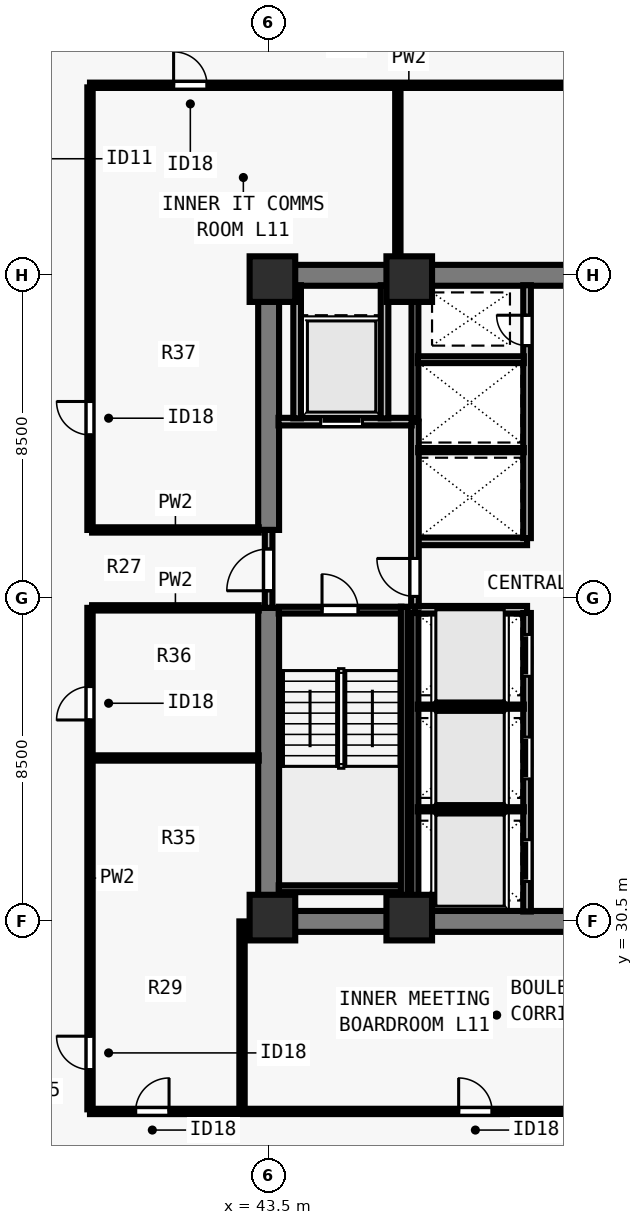
"""IFC4 building model, lengths in metres.
Left out: names, types, materials, properties, quantities, classifications, styles, units other than length and angle.
Written with IfcOpenShell. Run it as: python <this file> out.ifc"""

import sys

from ifc_helpers import new_model, si_unit, direction, frame, frame_2d, origin, origin_2d, place, context, subcontext, project, spatial, rectangle, extrude, element, fill, save


model = new_model("IFC4")
c1 = context("Model", 3, precision=1e-05, world=origin(), true_north=direction((0.0, 1.0)))
c2 = subcontext(c1, "Body", "Model", "MODEL_VIEW")
j1 = project(units=[si_unit("LENGTHUNIT", "METRE"), si_unit("PLANEANGLEUNIT", "RADIAN")], contexts=[c1])
p1 = place(None, origin())
s1 = spatial("IfcSite", under=j1, at=p1, CompositionType="ELEMENT")
p2 = place(p1, origin())
s2 = spatial("IfcBuilding", under=s1, at=p2, CompositionType="ELEMENT")
p3 = place(p2, frame((0.0, 0.0, 44.5)))
s3 = spatial("IfcBuildingStorey", under=s2, at=p3, CompositionType="ELEMENT", Elevation=44.5)
for number, where, z_axis, x_axis in (
    (1, (43.6, 30.6, 0.0), (0.0, 0.0, 1.0), (1.0, 0.0, 0.0)),
    (2, (47.2, 30.6, 0.0), (0.0, 0.0, 1.0), (1.0, 0.0, 0.0)),
    (3, (43.6, 47.4, 0.0), (0.0, 0.0, 1.0), (1.0, 0.0, 0.0)),
    (4, (47.2, 47.4, 0.0), (0.0, 0.0, 1.0), (1.0, 0.0, 0.0)),
):
    element("IfcColumn", number, at=place(p3, frame(where, z_axis=z_axis, x_axis=x_axis)), inside=s3, PredefinedType="COLUMN", context=c2, shape_type="SweptSolid", body=[
        extrude(rectangle(XDim=1.2, YDim=1.2, at=origin_2d()), origin(), (0.0, 0.0, 1.0), 3.5),
    ])
for number, where, z_axis, x_axis in (
    (5, (43.225, 30.5, 0.0), (0.0, 0.0, 1.0), (1.0, 0.0, 0.0)),
    (6, (43.225, 47.5, 0.0), (0.0, 0.0, 1.0), (1.0, 0.0, 0.0)),
):
    element("IfcWall", number, at=place(p3, frame(where, z_axis=z_axis, x_axis=x_axis)), inside=s3, PredefinedType="SHEAR", context=c2, shape_type="SweptSolid", body=[
        extrude(rectangle(XDim=17.55, YDim=0.55, at=frame_2d((8.775, 0.0))), origin(), (0.0, 0.0, 1.0), 3.28),
    ])
p4 = place(p3, frame((43.5, 30.765, 0.0), z_axis=(0.0, 0.0, 1.0), x_axis=(0.0, 1.0, 0.0)))
e7 = element("IfcWall", 7, at=p4, inside=s3, PredefinedType="SHEAR", context=c2, shape_type="SweptSolid", body=[
    extrude(rectangle(XDim=7.985, YDim=0.55, at=frame_2d((3.993, 0.0))), origin(), (0.0, 0.0, 1.0), 3.28),
])
p5 = place(p3, frame((43.5, 40.8, 0.0), z_axis=(0.0, 0.0, 1.0), x_axis=(0.0, 1.0, 0.0)))
e8 = element("IfcWall", 8, at=p5, inside=s3, PredefinedType="SHEAR", context=c2, shape_type="SweptSolid", body=[
    extrude(rectangle(XDim=6.435, YDim=0.55, at=frame_2d((3.218, 0.0))), origin(), (0.0, 0.0, 1.0), 3.28),
])
for number, where, z_axis, x_axis in (
    (9, (47.35, 38.7, 0.0), (0.0, 0.0, 1.0), (1.0, 0.0, 0.0)),
    (10, (47.35, 40.5, 0.0), (0.0, 0.0, 1.0), (1.0, 0.0, 0.0)),
):
    element("IfcWall", number, at=place(p3, frame(where, z_axis=z_axis, x_axis=x_axis)), inside=s3, PredefinedType="SOLIDWALL", context=c2, shape_type="SweptSolid", body=[
        extrude(rectangle(XDim=2.95, YDim=0.2, at=frame_2d((1.475, 0.0))), origin(), (0.0, 0.0, 1.0), 3.28),
    ])
p6 = place(p3, frame((50.3, 30.76, 0.0), z_axis=(0.0, 0.0, 1.0), x_axis=(0.0, 1.0, 0.0)))
e11 = element("IfcWall", 11, at=p6, inside=s3, PredefinedType="SOLIDWALL", context=c2, shape_type="SweptSolid", body=[
    extrude(rectangle(XDim=7.855, YDim=0.2, at=frame_2d((3.927, 0.0))), origin(), (0.0, 0.0, 1.0), 3.28),
])
p7 = place(p6, frame((0.79, 0.0, 0.0)))
e12 = element("IfcOpeningElement", 12, at=p7, cuts=e11, PredefinedType="OPENING", context=c2, shape_type="SweptSolid", body=[
    extrude(rectangle(XDim=1.1, YDim=2.2, at=frame_2d((0.55, 1.1))), frame((0.0, 0.11, 0.0), z_axis=(0.0, -1.0, 0.0), x_axis=(1.0, 0.0, 0.0)), (0.0, 0.0, 1.0), 0.22),
])
p8 = place(p6, frame((3.49, 0.0, 0.0)))
e13 = element("IfcOpeningElement", 13, at=p8, cuts=e11, PredefinedType="OPENING", context=c2, shape_type="SweptSolid", body=[
    extrude(rectangle(XDim=1.1, YDim=2.2, at=frame_2d((0.55, 1.1))), frame((0.0, 0.11, 0.0), z_axis=(0.0, -1.0, 0.0), x_axis=(1.0, 0.0, 0.0)), (0.0, 0.0, 1.0), 0.22),
])
p9 = place(p6, frame((6.19, 0.0, 0.0)))
e14 = element("IfcOpeningElement", 14, at=p9, cuts=e11, PredefinedType="OPENING", context=c2, shape_type="SweptSolid", body=[
    extrude(rectangle(XDim=1.1, YDim=2.2, at=frame_2d((0.55, 1.1))), frame((0.0, 0.11, 0.0), z_axis=(0.0, -1.0, 0.0), x_axis=(1.0, 0.0, 0.0)), (0.0, 0.0, 1.0), 0.22),
])
p10 = place(p3, frame((50.3, 40.585, 0.0), z_axis=(0.0, 0.0, 1.0), x_axis=(0.0, 1.0, 0.0)))
e15 = element("IfcWall", 15, at=p10, inside=s3, PredefinedType="SOLIDWALL", context=c2, shape_type="SweptSolid", body=[
    extrude(rectangle(XDim=6.655, YDim=0.2, at=frame_2d((3.328, 0.0))), origin(), (0.0, 0.0, 1.0), 3.28),
])
p11 = place(p10, frame((5.065, 0.0, 0.0)))
e16 = element("IfcOpeningElement", 16, at=p11, cuts=e15, PredefinedType="OPENING", context=c2, shape_type="SweptSolid", body=[
    extrude(rectangle(XDim=0.8, YDim=2.08, at=frame_2d((0.4, 1.04))), frame((0.0, 0.11, 0.0), z_axis=(0.0, -1.0, 0.0), x_axis=(1.0, 0.0, 0.0)), (0.0, 0.0, 1.0), 0.22),
])
p12 = place(p3, frame((43.5, 38.75, 0.0), z_axis=(0.0, 0.0, 1.0), x_axis=(0.0, 1.0, 0.0)))
e17 = element("IfcWall", 17, at=p12, inside=s3, PredefinedType="SOLIDWALL", context=c2, shape_type="SweptSolid", body=[
    extrude(rectangle(XDim=2.05, YDim=0.2, at=frame_2d((1.025, 0.0))), origin(), (0.0, 0.0, 1.0), 3.28),
])
p13 = place(p12, frame((0.45, 0.0, 0.0)))
e18 = element("IfcOpeningElement", 18, at=p13, cuts=e17, PredefinedType="OPENING", context=c2, shape_type="SweptSolid", body=[
    extrude(rectangle(XDim=1.1, YDim=2.15, at=frame_2d((0.55, 1.075))), frame((0.0, 0.11, 0.0), z_axis=(0.0, -1.0, 0.0), x_axis=(1.0, 0.0, 0.0)), (0.0, 0.0, 1.0), 0.22),
])
p14 = place(p3, frame((47.35, 38.785, 0.0), z_axis=(0.0, 0.0, 1.0), x_axis=(0.0, 1.0, 0.0)))
e19 = element("IfcWall", 19, at=p14, inside=s3, PredefinedType="SOLIDWALL", context=c2, shape_type="SweptSolid", body=[
    extrude(rectangle(XDim=4.865, YDim=0.2, at=frame_2d((2.433, 0.0))), origin(), (0.0, 0.0, 1.0), 3.28),
])
p15 = place(p14, frame((0.265, 0.0, 0.0)))
e20 = element("IfcOpeningElement", 20, at=p15, cuts=e19, PredefinedType="OPENING", context=c2, shape_type="SweptSolid", body=[
    extrude(rectangle(XDim=1.0, YDim=2.15, at=frame_2d((0.5, 1.075))), frame((0.0, 0.11, 0.0), z_axis=(0.0, -1.0, 0.0), x_axis=(1.0, 0.0, 0.0)), (0.0, 0.0, 1.0), 0.22),
])
p16 = place(p3, frame((43.76, 43.65, 0.0), z_axis=(0.0, 0.0, 1.0), x_axis=(1.0, 0.0, 0.0)))
e21 = element("IfcWall", 21, at=p16, inside=s3, PredefinedType="SOLIDWALL", context=c2, shape_type="SweptSolid", body=[
    extrude(rectangle(XDim=3.505, YDim=0.2, at=frame_2d((1.752, 0.0))), origin(), (0.0, 0.0, 1.0), 3.28),
])
p17 = place(p16, frame((1.11, 0.0, 0.0)))
e22 = element("IfcOpeningElement", 22, at=p17, cuts=e21, PredefinedType="OPENING", context=c2, shape_type="SweptSolid", body=[
    extrude(rectangle(XDim=1.1, YDim=2.2, at=frame_2d((0.55, 1.1))), frame((0.0, 0.11, 0.0), z_axis=(0.0, -1.0, 0.0), x_axis=(1.0, 0.0, 0.0)), (0.0, 0.0, 1.0), 0.22),
])
for number, where, z_axis, x_axis in (
    (23, (46.55, 43.735, 0.0), (0.0, 0.0, 1.0), (0.0, 1.0, 0.0)),
    (24, (44.25, 43.735, 0.0), (0.0, 0.0, 1.0), (0.0, 1.0, 0.0)),
):
    element("IfcWall", number, at=place(p3, frame(where, z_axis=z_axis, x_axis=x_axis)), inside=s3, PredefinedType="SOLIDWALL", context=c2, shape_type="SweptSolid", body=[
        extrude(rectangle(XDim=3.505, YDim=0.2, at=frame_2d((1.752, 0.0))), origin(), (0.0, 0.0, 1.0), 3.28),
    ])
p18 = place(p3, frame((47.35, 30.76, 0.0), z_axis=(0.0, 0.0, 1.0), x_axis=(0.0, 1.0, 0.0)))
e25 = element("IfcWall", 25, at=p18, inside=s3, PredefinedType="SOLIDWALL", context=c2, shape_type="SweptSolid", body=[
    extrude(rectangle(XDim=7.855, YDim=0.18, at=frame_2d((3.927, 0.0))), origin(), (0.0, 0.0, 1.0), 3.28),
])
for number, where, z_axis, x_axis in (
    (26, (47.425, 33.45, 0.0), (0.0, 0.0, 1.0), (1.0, 0.0, 0.0)),
    (27, (47.425, 36.15, 0.0), (0.0, 0.0, 1.0), (1.0, 0.0, 0.0)),
):
    element("IfcWall", number, at=place(p3, frame(where, z_axis=z_axis, x_axis=x_axis)), inside=s3, PredefinedType="PARTITIONING", context=c2, shape_type="SweptSolid", body=[
        extrude(rectangle(XDim=2.79, YDim=0.11, at=frame_2d((1.395, 0.0))), origin(), (0.0, 0.0, 1.0), 3.28),
    ])
p19 = place(p3, frame((47.35, 43.735, 0.0), z_axis=(0.0, 0.0, 1.0), x_axis=(0.0, 1.0, 0.0)))
e28 = element("IfcWall", 28, at=p19, inside=s3, PredefinedType="SOLIDWALL", context=c2, shape_type="SweptSolid", body=[
    extrude(rectangle(XDim=3.505, YDim=0.18, at=frame_2d((1.752, 0.0))), origin(), (0.0, 0.0, 1.0), 3.28),
])
p20 = place(p3, frame((47.435, 42.9, 0.0), z_axis=(0.0, 0.0, 1.0), x_axis=(1.0, 0.0, 0.0)))
e29 = element("IfcWall", 29, at=p20, inside=s3, PredefinedType="PARTITIONING", context=c2, shape_type="SweptSolid", body=[
    extrude(rectangle(XDim=2.78, YDim=0.11, at=frame_2d((1.39, 0.0))), origin(), (0.0, 0.0, 1.0), 3.28),
])
p21 = place(p3, frame((47.425, 45.28, 0.0), z_axis=(0.0, 0.0, 1.0), x_axis=(1.0, 0.0, 0.0)))
e30 = element("IfcWall", 30, at=p21, inside=s3, PredefinedType="SOLIDWALL", context=c2, shape_type="SweptSolid", body=[
    extrude(rectangle(XDim=2.79, YDim=0.18, at=frame_2d((1.395, 0.0))), origin(), (0.0, 0.0, 1.0), 3.28),
])
p22 = place(p3, frame((38.8, 25.5, 0.0), z_axis=(0.0, 0.0, 1.0), x_axis=(1.0, 0.0, 0.0)))
e31 = element("IfcWall", 31, at=p22, inside=s3, PredefinedType="PARTITIONING", context=c2, shape_type="SweptSolid", body=[
    extrude(rectangle(XDim=26.4, YDim=0.14, at=frame_2d((13.2, 0.0))), origin(), (0.0, 0.0, 1.0), 3.28),
])
p23 = place(p22, frame((1.2, 0.0, 0.0)))
e32 = element("IfcOpeningElement", 32, at=p23, cuts=e31, PredefinedType="OPENING", context=c2, shape_type="SweptSolid", body=[
    extrude(rectangle(XDim=0.88, YDim=2.1, at=frame_2d((0.44, 1.05))), frame((0.0, 0.08, 0.0), z_axis=(0.0, -1.0, 0.0), x_axis=(1.0, 0.0, 0.0)), (0.0, 0.0, 1.0), 0.16),
])
p24 = place(p22, frame((9.7, 0.0, 0.0)))
e33 = element("IfcOpeningElement", 33, at=p24, cuts=e31, PredefinedType="OPENING", context=c2, shape_type="SweptSolid", body=[
    extrude(rectangle(XDim=0.88, YDim=2.1, at=frame_2d((0.44, 1.05))), frame((0.0, 0.08, 0.0), z_axis=(0.0, -1.0, 0.0), x_axis=(1.0, 0.0, 0.0)), (0.0, 0.0, 1.0), 0.16),
])
p25 = place(p22, frame((20.2, 0.0, 0.0)))
e34 = element("IfcOpeningElement", 34, at=p25, cuts=e31, PredefinedType="OPENING", context=c2, shape_type="SweptSolid", body=[
    extrude(rectangle(XDim=0.88, YDim=2.1, at=frame_2d((0.44, 1.05))), frame((0.0, 0.08, 0.0), z_axis=(0.0, -1.0, 0.0), x_axis=(1.0, 0.0, 0.0)), (0.0, 0.0, 1.0), 0.16),
])
p26 = place(p3, frame((38.8, 52.5, 0.0), z_axis=(0.0, 0.0, 1.0), x_axis=(1.0, 0.0, 0.0)))
e35 = element("IfcWall", 35, at=p26, inside=s3, PredefinedType="PARTITIONING", context=c2, shape_type="SweptSolid", body=[
    extrude(rectangle(XDim=26.4, YDim=0.14, at=frame_2d((13.2, 0.0))), origin(), (0.0, 0.0, 1.0), 3.28),
])
p27 = place(p26, frame((2.2, 0.0, 0.0)))
e36 = element("IfcOpeningElement", 36, at=p27, cuts=e35, PredefinedType="OPENING", context=c2, shape_type="SweptSolid", body=[
    extrude(rectangle(XDim=0.88, YDim=2.1, at=frame_2d((0.44, 1.05))), frame((0.0, 0.08, 0.0), z_axis=(0.0, -1.0, 0.0), x_axis=(1.0, 0.0, 0.0)), (0.0, 0.0, 1.0), 0.16),
])
p28 = place(p26, frame((13.7, 0.0, 0.0)))
e37 = element("IfcOpeningElement", 37, at=p28, cuts=e35, PredefinedType="OPENING", context=c2, shape_type="SweptSolid", body=[
    extrude(rectangle(XDim=0.88, YDim=2.1, at=frame_2d((0.44, 1.05))), frame((0.0, 0.08, 0.0), z_axis=(0.0, -1.0, 0.0), x_axis=(1.0, 0.0, 0.0)), (0.0, 0.0, 1.0), 0.16),
])
p29 = place(p26, frame((23.2, 0.0, 0.0)))
e38 = element("IfcOpeningElement", 38, at=p29, cuts=e35, PredefinedType="OPENING", context=c2, shape_type="SweptSolid", body=[
    extrude(rectangle(XDim=0.88, YDim=2.1, at=frame_2d((0.44, 1.05))), frame((0.0, 0.08, 0.0), z_axis=(0.0, -1.0, 0.0), x_axis=(1.0, 0.0, 0.0)), (0.0, 0.0, 1.0), 0.16),
])
p30 = place(p3, frame((38.8, 25.555, 0.0), z_axis=(0.0, 0.0, 1.0), x_axis=(0.0, 1.0, 0.0)))
e39 = element("IfcWall", 39, at=p30, inside=s3, PredefinedType="PARTITIONING", context=c2, shape_type="SweptSolid", body=[
    extrude(rectangle(XDim=13.195, YDim=0.14, at=frame_2d((6.598, 0.0))), origin(), (0.0, 0.0, 1.0), 3.28),
])
p31 = place(p30, frame((1.045, 0.0, 0.0)))
e40 = element("IfcOpeningElement", 40, at=p31, cuts=e39, PredefinedType="OPENING", context=c2, shape_type="SweptSolid", body=[
    extrude(rectangle(XDim=0.88, YDim=2.1, at=frame_2d((0.44, 1.05))), frame((0.0, 0.08, 0.0), z_axis=(0.0, -1.0, 0.0), x_axis=(1.0, 0.0, 0.0)), (0.0, 0.0, 1.0), 0.16),
])
p32 = place(p30, frame((10.245, 0.0, 0.0)))
e41 = element("IfcOpeningElement", 41, at=p32, cuts=e39, PredefinedType="OPENING", context=c2, shape_type="SweptSolid", body=[
    extrude(rectangle(XDim=0.88, YDim=2.1, at=frame_2d((0.44, 1.05))), frame((0.0, 0.08, 0.0), z_axis=(0.0, -1.0, 0.0), x_axis=(1.0, 0.0, 0.0)), (0.0, 0.0, 1.0), 0.16),
])
p33 = place(p3, frame((38.8, 40.8, 0.0), z_axis=(0.0, 0.0, 1.0), x_axis=(0.0, 1.0, 0.0)))
e42 = element("IfcWall", 42, at=p33, inside=s3, PredefinedType="PARTITIONING", context=c2, shape_type="SweptSolid", body=[
    extrude(rectangle(XDim=11.645, YDim=0.14, at=frame_2d((5.823, 0.0))), origin(), (0.0, 0.0, 1.0), 3.28),
])
p34 = place(p33, frame((2.5, 0.0, 0.0)))
e43 = element("IfcOpeningElement", 43, at=p34, cuts=e42, PredefinedType="OPENING", context=c2, shape_type="SweptSolid", body=[
    extrude(rectangle(XDim=0.88, YDim=2.1, at=frame_2d((0.44, 1.05))), frame((0.0, 0.08, 0.0), z_axis=(0.0, -1.0, 0.0), x_axis=(1.0, 0.0, 0.0)), (0.0, 0.0, 1.0), 0.16),
])
for number, where, z_axis, x_axis in (
    (44, (38.855, 38.75, 0.0), (0.0, 0.0, 1.0), (1.0, 0.0, 0.0)),
    (45, (38.855, 40.8, 0.0), (0.0, 0.0, 1.0), (1.0, 0.0, 0.0)),
):
    element("IfcWall", number, at=place(p3, frame(where, z_axis=z_axis, x_axis=x_axis)), inside=s3, PredefinedType="PARTITIONING", context=c2, shape_type="SweptSolid", body=[
        extrude(rectangle(XDim=4.385, YDim=0.14, at=frame_2d((2.192, 0.0))), origin(), (0.0, 0.0, 1.0), 3.28),
    ])
p35 = place(p3, frame((42.8, 25.555, 0.0), z_axis=(0.0, 0.0, 1.0), x_axis=(0.0, 1.0, 0.0)))
e46 = element("IfcWall", 46, at=p35, inside=s3, PredefinedType="PARTITIONING", context=c2, shape_type="SweptSolid", body=[
    extrude(rectangle(XDim=4.945, YDim=0.14, at=frame_2d((2.473, 0.0))), origin(), (0.0, 0.0, 1.0), 2.439),
])
p36 = place(p3, frame((46.9, 47.76, 0.0), z_axis=(0.0, 0.0, 1.0), x_axis=(0.0, 1.0, 0.0)))
e47 = element("IfcWall", 47, at=p36, inside=s3, PredefinedType="PARTITIONING", context=c2, shape_type="SweptSolid", body=[
    extrude(rectangle(XDim=4.685, YDim=0.14, at=frame_2d((2.343, 0.0))), origin(), (0.0, 0.0, 1.0), 3.28),
])
p37 = place(p3, frame((38.855, 34.8, 0.0), z_axis=(0.0, 0.0, 1.0), x_axis=(1.0, 0.0, 0.0)))
e48 = element("IfcWall", 48, at=p37, inside=s3, PredefinedType="PARTITIONING", context=c2, shape_type="SweptSolid", body=[
    extrude(rectangle(XDim=4.385, YDim=0.14, at=frame_2d((2.192, 0.0))), origin(), (0.0, 0.0, 1.0), 3.28),
])
p38 = place(p3, frame((43.765, 38.69, 0.0), z_axis=(0.0, 0.0, 1.0), x_axis=(1.0, 0.0, 0.0)))
e49 = element("IfcWall", 49, at=p38, inside=s3, PredefinedType="SOLIDWALL", context=c2, shape_type="SweptSolid", body=[
    extrude(rectangle(XDim=3.23, YDim=0.18, at=frame_2d((1.615, 0.0))), origin(), (0.0, 0.0, 1.0), 3.28),
])
p39 = place(p38, frame((1.14, 0.0, 0.0)))
e50 = element("IfcOpeningElement", 50, at=p39, cuts=e49, PredefinedType="OPENING", context=c2, shape_type="SweptSolid", body=[
    extrude(rectangle(XDim=0.95, YDim=2.15, at=frame_2d((0.475, 1.075))), frame((0.0, 0.1, 0.0), z_axis=(0.0, -1.0, 0.0), x_axis=(1.0, 0.0, 0.0)), (0.0, 0.0, 1.0), 0.2),
])
p40 = place(p3, frame((43.765, 31.36, 0.0), z_axis=(0.0, 0.0, 1.0), x_axis=(1.0, 0.0, 0.0)))
e51 = element("IfcWall", 51, at=p40, inside=s3, PredefinedType="SOLIDWALL", context=c2, shape_type="SweptSolid", body=[
    extrude(rectangle(XDim=3.23, YDim=0.18, at=frame_2d((1.615, 0.0))), origin(), (0.0, 0.0, 1.0), 3.28),
])
p41 = place(p3, frame((47.07, 38.78, 0.0), z_axis=(0.0, 0.0, 1.0), x_axis=(0.0, -1.0, 0.0)))
e52 = element("IfcWall", 52, at=p41, inside=s3, PredefinedType="SOLIDWALL", context=c2, shape_type="SweptSolid", body=[
    extrude(rectangle(XDim=8.017, YDim=0.18, at=frame_2d((4.009, 0.0))), origin(), (0.0, 0.0, 1.0), 3.28),
])
p42 = place(p13, origin())
e53 = element("IfcDoor", 53, at=p42, inside=s3, OperationType="SINGLE_SWING_LEFT", PredefinedType="DOOR", context=c2, shape_type="SweptSolid", body=[
    extrude(rectangle(XDim=1.1, YDim=2.15, at=frame_2d((0.55, 1.075))), frame((0.0, 0.025, 0.0), z_axis=(0.0, -1.0, 0.0), x_axis=(1.0, 0.0, 0.0)), (0.0, 0.0, 1.0), 0.05),
])
fill(e18, e53)
p43 = place(p15, origin())
e54 = element("IfcDoor", 54, at=p43, inside=s3, OperationType="SINGLE_SWING_RIGHT", PredefinedType="DOOR", context=c2, shape_type="SweptSolid", body=[
    extrude(rectangle(XDim=1.0, YDim=2.15, at=frame_2d((0.5, 1.075))), frame((0.0, 0.025, 0.0), z_axis=(0.0, -1.0, 0.0), x_axis=(1.0, 0.0, 0.0)), (0.0, 0.0, 1.0), 0.05),
])
fill(e20, e54)
p44 = place(p17, origin())
e55 = element("IfcDoor", 55, at=p44, inside=s3, OperationType="SLIDING_TO_LEFT", PredefinedType="DOOR", context=c2, shape_type="SweptSolid", body=[
    extrude(rectangle(XDim=1.1, YDim=2.2, at=frame_2d((0.55, 1.1))), frame((0.0, 0.025, 0.0), z_axis=(0.0, -1.0, 0.0), x_axis=(1.0, 0.0, 0.0)), (0.0, 0.0, 1.0), 0.05),
])
fill(e22, e55)
p45 = place(p7, origin())
e56 = element("IfcDoor", 56, at=p45, inside=s3, OperationType="SLIDING_TO_LEFT", PredefinedType="DOOR", context=c2, shape_type="SweptSolid", body=[
    extrude(rectangle(XDim=1.1, YDim=2.2, at=frame_2d((0.55, 1.1))), frame((0.0, 0.025, 0.0), z_axis=(0.0, -1.0, 0.0), x_axis=(1.0, 0.0, 0.0)), (0.0, 0.0, 1.0), 0.05),
])
fill(e12, e56)
p46 = place(p8, origin())
e57 = element("IfcDoor", 57, at=p46, inside=s3, OperationType="SLIDING_TO_LEFT", PredefinedType="DOOR", context=c2, shape_type="SweptSolid", body=[
    extrude(rectangle(XDim=1.1, YDim=2.2, at=frame_2d((0.55, 1.1))), frame((0.0, 0.025, 0.0), z_axis=(0.0, -1.0, 0.0), x_axis=(1.0, 0.0, 0.0)), (0.0, 0.0, 1.0), 0.05),
])
fill(e13, e57)
p47 = place(p9, origin())
e58 = element("IfcDoor", 58, at=p47, inside=s3, OperationType="SLIDING_TO_LEFT", PredefinedType="DOOR", context=c2, shape_type="SweptSolid", body=[
    extrude(rectangle(XDim=1.1, YDim=2.2, at=frame_2d((0.55, 1.1))), frame((0.0, 0.025, 0.0), z_axis=(0.0, -1.0, 0.0), x_axis=(1.0, 0.0, 0.0)), (0.0, 0.0, 1.0), 0.05),
])
fill(e14, e58)
p48 = place(p11, origin())
e59 = element("IfcDoor", 59, at=p48, inside=s3, OperationType="SINGLE_SWING_RIGHT", PredefinedType="DOOR", context=c2, shape_type="SweptSolid", body=[
    extrude(rectangle(XDim=0.8, YDim=2.08, at=frame_2d((0.4, 1.04))), frame((0.0, 0.025, 0.0), z_axis=(0.0, -1.0, 0.0), x_axis=(1.0, 0.0, 0.0)), (0.0, 0.0, 1.0), 0.05),
])
fill(e16, e59)
p49 = place(p23, origin())
e60 = element("IfcDoor", 60, at=p49, inside=s3, OperationType="SINGLE_SWING_RIGHT", PredefinedType="DOOR", context=c2, shape_type="SweptSolid", body=[
    extrude(rectangle(XDim=0.88, YDim=2.1, at=frame_2d((0.44, 1.05))), frame((0.0, 0.025, 0.0), z_axis=(0.0, -1.0, 0.0), x_axis=(1.0, 0.0, 0.0)), (0.0, 0.0, 1.0), 0.05),
])
fill(e32, e60)
p50 = place(p24, origin())
e61 = element("IfcDoor", 61, at=p50, inside=s3, OperationType="SINGLE_SWING_LEFT", PredefinedType="DOOR", context=c2, shape_type="SweptSolid", body=[
    extrude(rectangle(XDim=0.88, YDim=2.1, at=frame_2d((0.44, 1.05))), frame((0.0, 0.025, 0.0), z_axis=(0.0, -1.0, 0.0), x_axis=(1.0, 0.0, 0.0)), (0.0, 0.0, 1.0), 0.05),
])
fill(e33, e61)
p51 = place(p27, origin())
e62 = element("IfcDoor", 62, at=p51, inside=s3, OperationType="SINGLE_SWING_LEFT", PredefinedType="DOOR", context=c2, shape_type="SweptSolid", body=[
    extrude(rectangle(XDim=0.88, YDim=2.1, at=frame_2d((0.44, 1.05))), frame((0.0, 0.025, 0.0), z_axis=(0.0, -1.0, 0.0), x_axis=(1.0, 0.0, 0.0)), (0.0, 0.0, 1.0), 0.05),
])
fill(e36, e62)
p52 = place(p31, origin())
e63 = element("IfcDoor", 63, at=p52, inside=s3, OperationType="SINGLE_SWING_RIGHT", PredefinedType="DOOR", context=c2, shape_type="SweptSolid", body=[
    extrude(rectangle(XDim=0.88, YDim=2.1, at=frame_2d((0.44, 1.05))), frame((0.0, 0.025, 0.0), z_axis=(0.0, -1.0, 0.0), x_axis=(1.0, 0.0, 0.0)), (0.0, 0.0, 1.0), 0.05),
])
fill(e40, e63)
p53 = place(p32, origin())
e64 = element("IfcDoor", 64, at=p53, inside=s3, OperationType="SINGLE_SWING_LEFT", PredefinedType="DOOR", context=c2, shape_type="SweptSolid", body=[
    extrude(rectangle(XDim=0.88, YDim=2.1, at=frame_2d((0.44, 1.05))), frame((0.0, 0.025, 0.0), z_axis=(0.0, -1.0, 0.0), x_axis=(1.0, 0.0, 0.0)), (0.0, 0.0, 1.0), 0.05),
])
fill(e41, e64)
p54 = place(p34, origin())
e65 = element("IfcDoor", 65, at=p54, inside=s3, OperationType="SINGLE_SWING_RIGHT", PredefinedType="DOOR", context=c2, shape_type="SweptSolid", body=[
    extrude(rectangle(XDim=0.88, YDim=2.1, at=frame_2d((0.44, 1.05))), frame((0.0, 0.025, 0.0), z_axis=(0.0, -1.0, 0.0), x_axis=(1.0, 0.0, 0.0)), (0.0, 0.0, 1.0), 0.05),
])
fill(e43, e65)
p55 = place(p39, origin())
e66 = element("IfcDoor", 66, at=p55, inside=s3, OperationType="SINGLE_SWING_LEFT", PredefinedType="DOOR", context=c2, shape_type="SweptSolid", body=[
    extrude(rectangle(XDim=0.95, YDim=2.15, at=frame_2d((0.475, 1.075))), frame((0.0, 0.025, 0.0), z_axis=(0.0, -1.0, 0.0), x_axis=(1.0, 0.0, 0.0)), (0.0, 0.0, 1.0), 0.05),
])
fill(e50, e66)
save(model, sys.argv[1])
